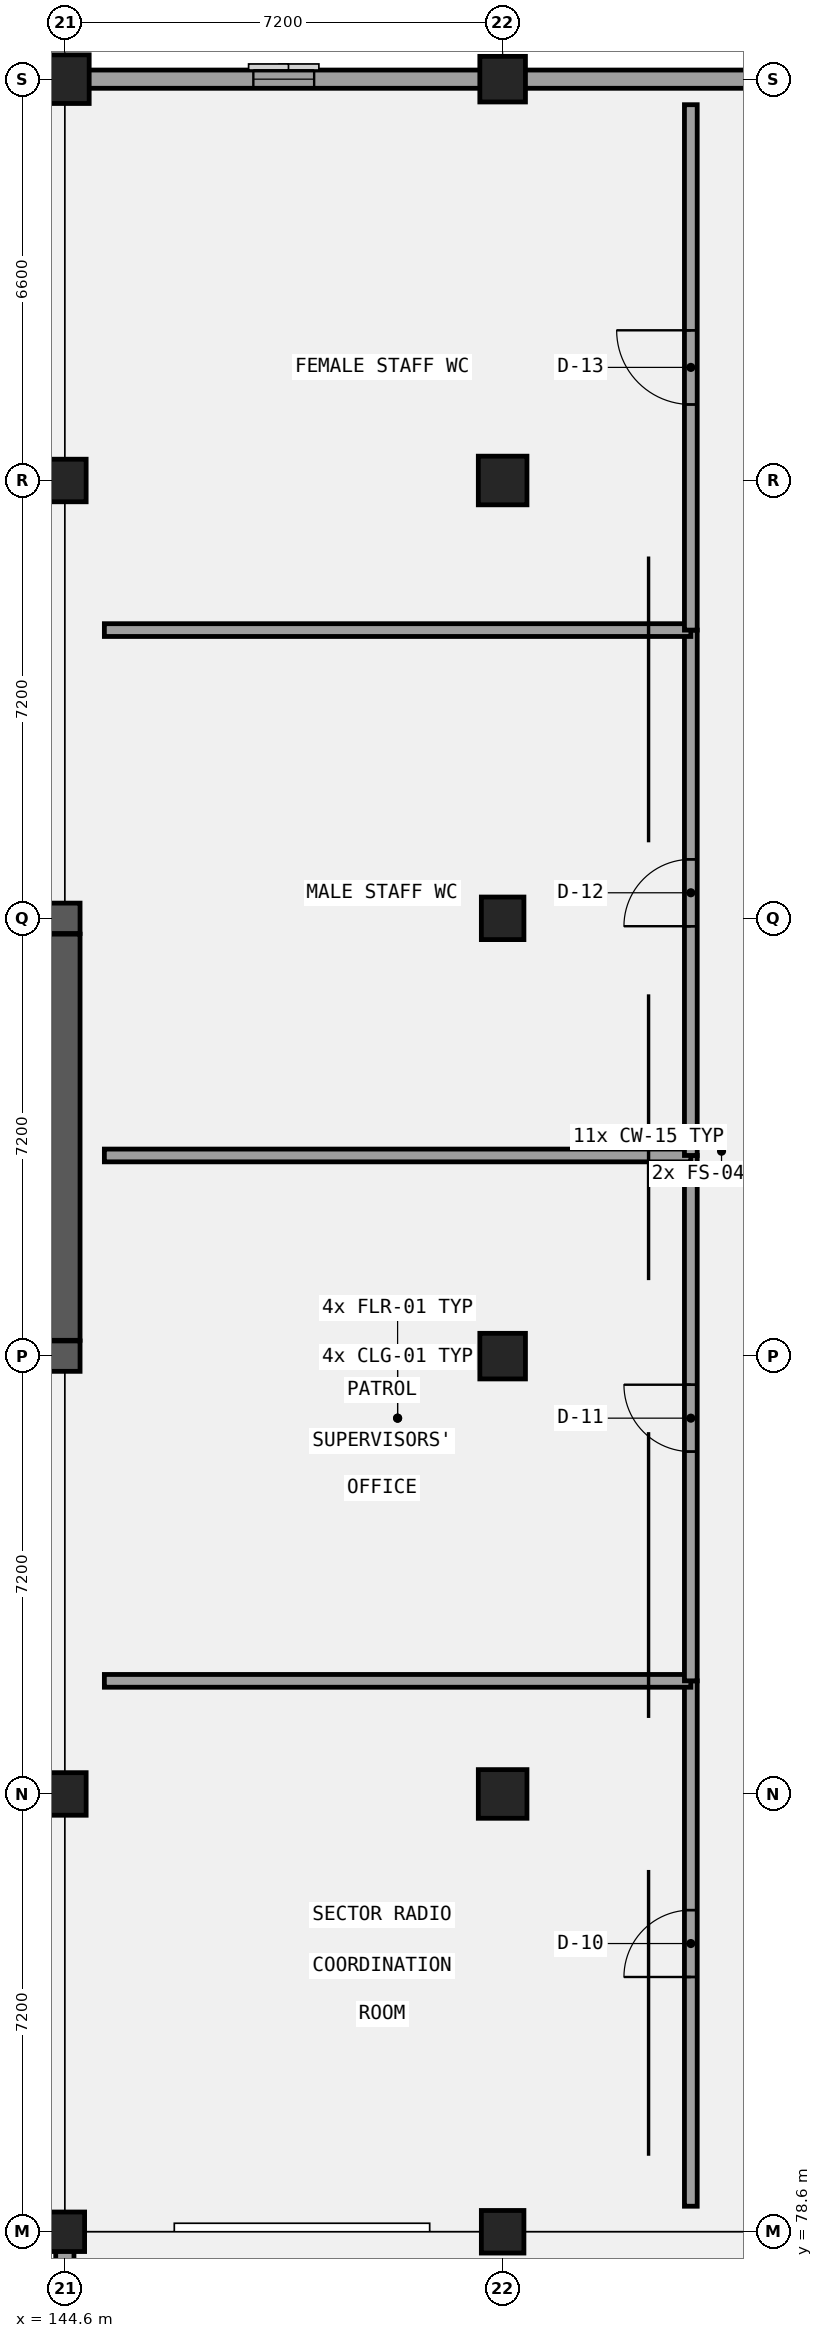
"""IFC4 building model, lengths in metres.
Left out: names, types, materials, properties, quantities, classifications, styles, units other than length and angle.
Written with IfcOpenShell. Run it as: python <this file> out.ifc"""

import sys

from ifc_helpers import new_model, si_unit, direction, frame, frame_2d, origin, origin_2d, place, context, subcontext, project, spatial, rectangle, circle, extrude, element, fill, save


model = new_model("IFC4")
c1 = context("Model", 3, precision=1e-05, world=origin(), true_north=direction((0.0, 1.0)))
c2 = subcontext(c1, "Body", "Model", "MODEL_VIEW")
j1 = project(units=[si_unit("LENGTHUNIT", "METRE"), si_unit("PLANEANGLEUNIT", "RADIAN")], contexts=[c1])
p1 = place(None, origin())
s1 = spatial("IfcSite", under=j1, at=p1, CompositionType="ELEMENT")
p2 = place(p1, origin())
s2 = spatial("IfcBuilding", under=s1, at=p2, CompositionType="ELEMENT")
p3 = place(p2, frame((0.0, 0.0, 5.4)))
s3 = spatial("IfcBuildingStorey", under=s2, at=p3, CompositionType="ELEMENT", Elevation=5.4)
p4 = place(p3, frame((129.95, 100.2, 0.0), z_axis=(0.0, 0.0, 1.0), x_axis=(1.0, 0.0, 0.0)))
e1 = element("IfcWall", 1, at=p4, inside=s3, PredefinedType="SHEAR", context=c2, shape_type="SweptSolid", body=[
    extrude(rectangle(XDim=14.9, YDim=0.5, at=frame_2d((7.45, 0.0))), origin(), (0.0, 0.0, 1.0), 4.2),
])
p5 = place(p3, frame((129.95, 93.0, 0.0), z_axis=(0.0, 0.0, 1.0), x_axis=(1.0, 0.0, 0.0)))
e2 = element("IfcWall", 2, at=p5, inside=s3, PredefinedType="SHEAR", context=c2, shape_type="SweptSolid", body=[
    extrude(rectangle(XDim=14.9, YDim=0.5, at=frame_2d((7.45, 0.0))), origin(), (0.0, 0.0, 1.0), 4.2),
])
p6 = place(p5, frame((3.8, 0.0, 0.0)))
e3 = element("IfcOpeningElement", 3, at=p6, cuts=e2, PredefinedType="OPENING", context=c2, shape_type="SweptSolid", body=[
    extrude(rectangle(XDim=1.3, YDim=2.2, at=frame_2d((0.65, 1.1))), frame((0.0, 0.26, 0.0), z_axis=(0.0, -1.0, 0.0), x_axis=(1.0, 0.0, 0.0)), (0.0, 0.0, 1.0), 0.52),
])
p7 = place(p5, frame((11.8, 0.0, 0.0)))
e4 = element("IfcOpeningElement", 4, at=p7, cuts=e2, PredefinedType="OPENING", context=c2, shape_type="SweptSolid", body=[
    extrude(rectangle(XDim=1.3, YDim=2.2, at=frame_2d((0.65, 1.1))), frame((0.0, 0.26, 0.0), z_axis=(0.0, -1.0, 0.0), x_axis=(1.0, 0.0, 0.0)), (0.0, 0.0, 1.0), 0.52),
])
p8 = place(p3, frame((144.6, 93.26, 0.0), z_axis=(0.0, 0.0, 1.0), x_axis=(0.0, 1.0, 0.0)))
e5 = element("IfcWall", 5, at=p8, inside=s3, PredefinedType="SHEAR", context=c2, shape_type="SweptSolid", body=[
    extrude(rectangle(XDim=6.68, YDim=0.5, at=frame_2d((3.34, 0.0))), origin(), (0.0, 0.0, 1.0), 4.2),
])
p9 = place(p3, frame((144.6, 78.6, 0.0), z_axis=(0.0, 0.0, 1.0), x_axis=(1.0, 0.0, 0.0)))
e6 = element("IfcColumn", 6, at=p9, inside=s3, PredefinedType="COLUMN", context=c2, shape_type="SweptSolid", body=[
    extrude(circle(Radius=0.325, at=origin_2d()), origin(), (0.0, 0.0, 1.0), 4.2),
])
for number, where, z_axis, x_axis in (
    (7, (144.6, 85.8, 0.0), (0.0, 0.0, 1.0), (1.0, 0.0, 0.0)),
    (8, (144.6, 107.4, 0.0), (0.0, 0.0, 1.0), (1.0, 0.0, 0.0)),
):
    element("IfcColumn", number, at=place(p3, frame(where, z_axis=z_axis, x_axis=x_axis)), inside=s3, PredefinedType="COLUMN", context=c2, shape_type="SweptSolid", body=[
        extrude(rectangle(XDim=0.7, YDim=0.7, at=origin_2d()), origin(), (0.0, 0.0, 1.0), 4.2),
    ])
p10 = place(p3, frame((144.6, 114.0, 0.0), z_axis=(0.0, 0.0, 1.0), x_axis=(1.0, 0.0, 0.0)))
e9 = element("IfcColumn", 9, at=p10, inside=s3, PredefinedType="COLUMN", context=c2, shape_type="SweptSolid", body=[
    extrude(rectangle(XDim=0.8, YDim=0.8, at=origin_2d()), origin(), (0.0, 0.0, 1.0), 4.2),
])
p11 = place(p3, frame((151.8, 78.6, 0.0), z_axis=(0.0, 0.0, 1.0), x_axis=(1.0, 0.0, 0.0)))
e10 = element("IfcColumn", 10, at=p11, inside=s3, PredefinedType="COLUMN", context=c2, shape_type="SweptSolid", body=[
    extrude(rectangle(XDim=0.7, YDim=0.7, at=origin_2d()), origin(), (0.0, 0.0, 1.0), 4.2),
])
p12 = place(p3, frame((151.8, 85.8, 0.0), z_axis=(0.0, 0.0, 1.0), x_axis=(1.0, 0.0, 0.0)))
e11 = element("IfcColumn", 11, at=p12, inside=s3, PredefinedType="COLUMN", context=c2, shape_type="SweptSolid", body=[
    extrude(rectangle(XDim=0.8, YDim=0.8, at=origin_2d()), origin(), (0.0, 0.0, 1.0), 4.2),
])
p13 = place(p3, frame((151.8, 93.0, 0.0), z_axis=(0.0, 0.0, 1.0), x_axis=(1.0, 0.0, 0.0)))
e12 = element("IfcColumn", 12, at=p13, inside=s3, PredefinedType="COLUMN", context=c2, shape_type="SweptSolid", body=[
    extrude(rectangle(XDim=0.75, YDim=0.75, at=origin_2d()), origin(), (0.0, 0.0, 1.0), 4.2),
])
p14 = place(p3, frame((151.8, 100.2, 0.0), z_axis=(0.0, 0.0, 1.0), x_axis=(1.0, 0.0, 0.0)))
e13 = element("IfcColumn", 13, at=p14, inside=s3, PredefinedType="COLUMN", context=c2, shape_type="SweptSolid", body=[
    extrude(rectangle(XDim=0.7, YDim=0.7, at=origin_2d()), origin(), (0.0, 0.0, 1.0), 4.2),
])
p15 = place(p3, frame((151.8, 107.4, 0.0), z_axis=(0.0, 0.0, 1.0), x_axis=(1.0, 0.0, 0.0)))
e14 = element("IfcColumn", 14, at=p15, inside=s3, PredefinedType="COLUMN", context=c2, shape_type="SweptSolid", body=[
    extrude(rectangle(XDim=0.8, YDim=0.8, at=origin_2d()), origin(), (0.0, 0.0, 1.0), 4.2),
])
p16 = place(p3, frame((151.8, 114.0, 0.0), z_axis=(0.0, 0.0, 1.0), x_axis=(1.0, 0.0, 0.0)))
e15 = element("IfcColumn", 15, at=p16, inside=s3, PredefinedType="COLUMN", context=c2, shape_type="SweptSolid", body=[
    extrude(rectangle(XDim=0.75, YDim=0.75, at=origin_2d()), origin(), (0.0, 0.0, 1.0), 4.2),
])
p17 = place(p3, frame((166.35, 114.0, 0.0), z_axis=(0.0, 0.0, 1.0), x_axis=(-1.0, 0.0, 0.0)))
e16 = element("IfcWall", 16, at=p17, inside=s3, PredefinedType="SOLIDWALL", context=c2, shape_type="SweptSolid", body=[
    extrude(rectangle(XDim=21.9, YDim=0.3, at=frame_2d((10.95, 0.0))), origin(), (0.0, 0.0, 1.0), 3.17),
])
p18 = place(p17, frame((17.65, 0.0, 0.95)))
e17 = element("IfcOpeningElement", 17, at=p18, cuts=e16, PredefinedType="OPENING", context=c2, shape_type="SweptSolid", body=[
    extrude(rectangle(XDim=1.0, YDim=1.9, at=frame_2d((0.5, 0.95))), frame((0.0, 0.16, 0.0), z_axis=(0.0, -1.0, 0.0), x_axis=(1.0, 0.0, 0.0)), (0.0, 0.0, 1.0), 0.32),
])
p19 = place(p3, frame((144.75, 114.0, 0.0), z_axis=(0.0, 0.0, 1.0), x_axis=(-1.0, 0.0, 0.0)))
e18 = element("IfcWall", 18, at=p19, inside=s3, PredefinedType="SOLIDWALL", context=c2, shape_type="SweptSolid", body=[
    extrude(rectangle(XDim=36.3, YDim=0.3, at=frame_2d((18.15, 0.0))), origin(), (0.0, 0.0, 1.0), 3.17),
])
p20 = place(p19, frame((32.05, 0.0, 0.95)))
e19 = element("IfcOpeningElement", 19, at=p20, cuts=e18, PredefinedType="OPENING", context=c2, shape_type="SweptSolid", body=[
    extrude(rectangle(XDim=1.0, YDim=1.9, at=frame_2d((0.5, 0.95))), frame((0.0, 0.16, 0.0), z_axis=(0.0, -1.0, 0.0), x_axis=(1.0, 0.0, 0.0)), (0.0, 0.0, 1.0), 0.32),
])
p21 = place(p19, frame((24.775, 0.0, 0.95)))
e20 = element("IfcOpeningElement", 20, at=p21, cuts=e18, PredefinedType="OPENING", context=c2, shape_type="SweptSolid", body=[
    extrude(rectangle(XDim=1.15, YDim=1.4, at=frame_2d((0.575, 0.7))), frame((0.0, 0.16, 0.0), z_axis=(0.0, -1.0, 0.0), x_axis=(1.0, 0.0, 0.0)), (0.0, 0.0, 1.0), 0.32),
])
p22 = place(p19, frame((17.575, 0.0, 0.95)))
e21 = element("IfcOpeningElement", 21, at=p22, cuts=e18, PredefinedType="OPENING", context=c2, shape_type="SweptSolid", body=[
    extrude(rectangle(XDim=1.15, YDim=1.65, at=frame_2d((0.575, 0.825))), frame((0.0, 0.16, 0.0), z_axis=(0.0, -1.0, 0.0), x_axis=(1.0, 0.0, 0.0)), (0.0, 0.0, 1.0), 0.32),
])
p23 = place(p19, frame((10.375, 0.0, 0.95)))
e22 = element("IfcOpeningElement", 22, at=p23, cuts=e18, PredefinedType="OPENING", context=c2, shape_type="SweptSolid", body=[
    extrude(rectangle(XDim=1.15, YDim=1.9, at=frame_2d((0.575, 0.95))), frame((0.0, 0.16, 0.0), z_axis=(0.0, -1.0, 0.0), x_axis=(1.0, 0.0, 0.0)), (0.0, 0.0, 1.0), 0.32),
])
p24 = place(p19, frame((3.1, 0.0, 0.95)))
e23 = element("IfcOpeningElement", 23, at=p24, cuts=e18, PredefinedType="OPENING", context=c2, shape_type="SweptSolid", body=[
    extrude(rectangle(XDim=1.3, YDim=1.4, at=frame_2d((0.65, 0.7))), frame((0.0, 0.16, 0.0), z_axis=(0.0, -1.0, 0.0), x_axis=(1.0, 0.0, 0.0)), (0.0, 0.0, 1.0), 0.32),
])
p25 = place(p3, frame((108.45, 78.6, 0.0), z_axis=(0.0, 0.0, 1.0), x_axis=(1.0, 0.0, 0.0)))
e24 = element("IfcWall", 24, at=p25, inside=s3, PredefinedType="SOLIDWALL", context=c2, shape_type="SweptSolid", body=[
    extrude(rectangle(XDim=36.3, YDim=0.3, at=frame_2d((18.15, 0.0))), origin(), (0.0, 0.0, 1.0), 3.02),
])
p26 = place(p25, frame((3.175, 0.0, 0.95)))
e25 = element("IfcOpeningElement", 25, at=p26, cuts=e24, PredefinedType="OPENING", context=c2, shape_type="SweptSolid", body=[
    extrude(rectangle(XDim=1.15, YDim=1.65, at=frame_2d((0.575, 0.825))), frame((0.0, 0.16, 0.0), z_axis=(0.0, -1.0, 0.0), x_axis=(1.0, 0.0, 0.0)), (0.0, 0.0, 1.0), 0.32),
])
p27 = place(p25, frame((10.3, 0.0, 0.95)))
e26 = element("IfcOpeningElement", 26, at=p27, cuts=e24, PredefinedType="OPENING", context=c2, shape_type="SweptSolid", body=[
    extrude(rectangle(XDim=1.3, YDim=1.4, at=frame_2d((0.65, 0.7))), frame((0.0, 0.16, 0.0), z_axis=(0.0, -1.0, 0.0), x_axis=(1.0, 0.0, 0.0)), (0.0, 0.0, 1.0), 0.32),
])
p28 = place(p25, frame((17.5, 0.0, 0.95)))
e27 = element("IfcOpeningElement", 27, at=p28, cuts=e24, PredefinedType="OPENING", context=c2, shape_type="SweptSolid", body=[
    extrude(rectangle(XDim=1.3, YDim=1.65, at=frame_2d((0.65, 0.825))), frame((0.0, 0.16, 0.0), z_axis=(0.0, -1.0, 0.0), x_axis=(1.0, 0.0, 0.0)), (0.0, 0.0, 1.0), 0.32),
])
p29 = place(p25, frame((24.625, 0.0, 0.95)))
e28 = element("IfcOpeningElement", 28, at=p29, cuts=e24, PredefinedType="OPENING", context=c2, shape_type="SweptSolid", body=[
    extrude(rectangle(XDim=1.45, YDim=1.4, at=frame_2d((0.725, 0.7))), frame((0.0, 0.16, 0.0), z_axis=(0.0, -1.0, 0.0), x_axis=(1.0, 0.0, 0.0)), (0.0, 0.0, 1.0), 0.32),
])
p30 = place(p25, frame((31.825, 0.0, 0.95)))
e29 = element("IfcOpeningElement", 29, at=p30, cuts=e24, PredefinedType="OPENING", context=c2, shape_type="SweptSolid", body=[
    extrude(rectangle(XDim=1.45, YDim=1.65, at=frame_2d((0.725, 0.825))), frame((0.0, 0.16, 0.0), z_axis=(0.0, -1.0, 0.0), x_axis=(1.0, 0.0, 0.0)), (0.0, 0.0, 1.0), 0.32),
])
p31 = place(p3, frame((144.6, 78.45, 0.0), z_axis=(0.0, 0.0, 1.0), x_axis=(0.0, -1.0, 0.0)))
e30 = element("IfcWall", 30, at=p31, inside=s3, PredefinedType="SOLIDWALL", context=c2, shape_type="SweptSolid", body=[
    extrude(rectangle(XDim=42.9, YDim=0.3, at=frame_2d((21.45, 0.0))), origin(), (0.0, 0.0, 1.0), 2.92),
])
p32 = place(p31, frame((38.275, 0.0, 1.0)))
e31 = element("IfcOpeningElement", 31, at=p32, cuts=e30, PredefinedType="OPENING", context=c2, shape_type="SweptSolid", body=[
    extrude(rectangle(XDim=2.2, YDim=1.4, at=frame_2d((1.1, 0.7))), frame((0.0, 0.16, 0.0), z_axis=(0.0, -1.0, 0.0), x_axis=(1.0, 0.0, 0.0)), (0.0, 0.0, 1.0), 0.32),
])
p33 = place(p31, frame((31.15, 0.0, 1.0)))
e32 = element("IfcOpeningElement", 32, at=p33, cuts=e30, PredefinedType="OPENING", context=c2, shape_type="SweptSolid", body=[
    extrude(rectangle(XDim=2.2, YDim=1.4, at=frame_2d((1.1, 0.7))), frame((0.0, 0.16, 0.0), z_axis=(0.0, -1.0, 0.0), x_axis=(1.0, 0.0, 0.0)), (0.0, 0.0, 1.0), 0.32),
])
p34 = place(p31, frame((23.95, 0.0, 1.0)))
e33 = element("IfcOpeningElement", 33, at=p34, cuts=e30, PredefinedType="OPENING", context=c2, shape_type="SweptSolid", body=[
    extrude(rectangle(XDim=2.2, YDim=1.4, at=frame_2d((1.1, 0.7))), frame((0.0, 0.16, 0.0), z_axis=(0.0, -1.0, 0.0), x_axis=(1.0, 0.0, 0.0)), (0.0, 0.0, 1.0), 0.32),
])
p35 = place(p31, frame((16.75, 0.0, 1.0)))
e34 = element("IfcOpeningElement", 34, at=p35, cuts=e30, PredefinedType="OPENING", context=c2, shape_type="SweptSolid", body=[
    extrude(rectangle(XDim=2.2, YDim=1.4, at=frame_2d((1.1, 0.7))), frame((0.0, 0.16, 0.0), z_axis=(0.0, -1.0, 0.0), x_axis=(1.0, 0.0, 0.0)), (0.0, 0.0, 1.0), 0.32),
])
p36 = place(p31, frame((9.55, 0.0, 1.0)))
e35 = element("IfcOpeningElement", 35, at=p36, cuts=e30, PredefinedType="OPENING", context=c2, shape_type="SweptSolid", body=[
    extrude(rectangle(XDim=2.2, YDim=1.4, at=frame_2d((1.1, 0.7))), frame((0.0, 0.16, 0.0), z_axis=(0.0, -1.0, 0.0), x_axis=(1.0, 0.0, 0.0)), (0.0, 0.0, 1.0), 0.32),
])
p37 = place(p31, frame((2.425, 0.0, 1.0)))
e36 = element("IfcOpeningElement", 36, at=p37, cuts=e30, PredefinedType="OPENING", context=c2, shape_type="SweptSolid", body=[
    extrude(rectangle(XDim=2.2, YDim=1.4, at=frame_2d((1.1, 0.7))), frame((0.0, 0.16, 0.0), z_axis=(0.0, -1.0, 0.0), x_axis=(1.0, 0.0, 0.0)), (0.0, 0.0, 1.0), 0.32),
])
p38 = place(p3, frame((154.895, 79.02, 0.0), z_axis=(0.0, 0.0, 1.0), x_axis=(0.0, 1.0, 0.0)))
e37 = element("IfcWall", 37, at=p38, inside=s3, PredefinedType="PARTITIONING", context=c2, shape_type="SweptSolid", body=[
    extrude(rectangle(XDim=8.64, YDim=0.21, at=frame_2d((4.32, 0.0))), origin(), (0.0, 0.0, 1.0), 3.92),
])
p39 = place(p38, frame((3.77, 0.0, 0.0)))
e38 = element("IfcOpeningElement", 38, at=p39, cuts=e37, PredefinedType="OPENING", context=c2, shape_type="SweptSolid", body=[
    extrude(rectangle(XDim=1.1, YDim=2.1, at=frame_2d((0.55, 1.05))), frame((0.0, 0.115, 0.0), z_axis=(0.0, -1.0, 0.0), x_axis=(1.0, 0.0, 0.0)), (0.0, 0.0, 1.0), 0.23),
])
p40 = place(p3, frame((145.25, 87.66, 0.0), z_axis=(0.0, 0.0, 1.0), x_axis=(1.0, 0.0, 0.0)))
e39 = element("IfcWall", 39, at=p40, inside=s3, PredefinedType="PARTITIONING", context=c2, shape_type="SweptSolid", body=[
    extrude(rectangle(XDim=9.645, YDim=0.21, at=frame_2d((4.823, 0.0))), origin(), (0.0, 0.0, 1.0), 3.37),
])
p41 = place(p3, frame((154.895, 87.66, 0.0), z_axis=(0.0, 0.0, 1.0), x_axis=(0.0, 1.0, 0.0)))
e40 = element("IfcWall", 40, at=p41, inside=s3, PredefinedType="PARTITIONING", context=c2, shape_type="SweptSolid", body=[
    extrude(rectangle(XDim=8.64, YDim=0.21, at=frame_2d((4.32, 0.0))), origin(), (0.0, 0.0, 1.0), 3.92),
])
p42 = place(p41, frame((3.77, 0.0, 0.0)))
e41 = element("IfcOpeningElement", 41, at=p42, cuts=e40, PredefinedType="OPENING", context=c2, shape_type="SweptSolid", body=[
    extrude(rectangle(XDim=1.1, YDim=2.22, at=frame_2d((0.55, 1.11))), frame((0.0, 0.115, 0.0), z_axis=(0.0, -1.0, 0.0), x_axis=(1.0, 0.0, 0.0)), (0.0, 0.0, 1.0), 0.23),
])
p43 = place(p3, frame((145.25, 96.3, 0.0), z_axis=(0.0, 0.0, 1.0), x_axis=(1.0, 0.0, 0.0)))
e42 = element("IfcWall", 42, at=p43, inside=s3, PredefinedType="PARTITIONING", context=c2, shape_type="SweptSolid", body=[
    extrude(rectangle(XDim=9.645, YDim=0.21, at=frame_2d((4.823, 0.0))), origin(), (0.0, 0.0, 1.0), 3.92),
])
p44 = place(p3, frame((154.895, 96.3, 0.0), z_axis=(0.0, 0.0, 1.0), x_axis=(0.0, 1.0, 0.0)))
e43 = element("IfcWall", 43, at=p44, inside=s3, PredefinedType="PARTITIONING", context=c2, shape_type="SweptSolid", body=[
    extrude(rectangle(XDim=8.64, YDim=0.21, at=frame_2d((4.32, 0.0))), origin(), (0.0, 0.0, 1.0), 3.92),
])
p45 = place(p44, frame((3.77, 0.0, 0.0)))
e44 = element("IfcOpeningElement", 44, at=p45, cuts=e43, PredefinedType="OPENING", context=c2, shape_type="SweptSolid", body=[
    extrude(rectangle(XDim=1.1, YDim=2.35, at=frame_2d((0.55, 1.175))), frame((0.0, 0.115, 0.0), z_axis=(0.0, -1.0, 0.0), x_axis=(1.0, 0.0, 0.0)), (0.0, 0.0, 1.0), 0.23),
])
p46 = place(p3, frame((145.25, 104.94, 0.0), z_axis=(0.0, 0.0, 1.0), x_axis=(1.0, 0.0, 0.0)))
e45 = element("IfcWall", 45, at=p46, inside=s3, PredefinedType="PARTITIONING", context=c2, shape_type="SweptSolid", body=[
    extrude(rectangle(XDim=9.645, YDim=0.21, at=frame_2d((4.823, 0.0))), origin(), (0.0, 0.0, 1.0), 3.92),
])
p47 = place(p3, frame((154.895, 104.94, 0.0), z_axis=(0.0, 0.0, 1.0), x_axis=(0.0, 1.0, 0.0)))
e46 = element("IfcWall", 46, at=p47, inside=s3, PredefinedType="PARTITIONING", context=c2, shape_type="SweptSolid", body=[
    extrude(rectangle(XDim=8.64, YDim=0.21, at=frame_2d((4.32, 0.0))), origin(), (0.0, 0.0, 1.0), 3.92),
])
p48 = place(p47, frame((3.71, 0.0, 0.0)))
e47 = element("IfcOpeningElement", 47, at=p48, cuts=e46, PredefinedType="OPENING", context=c2, shape_type="SweptSolid", body=[
    extrude(rectangle(XDim=1.22, YDim=2.1, at=frame_2d((0.61, 1.05))), frame((0.0, 0.115, 0.0), z_axis=(0.0, -1.0, 0.0), x_axis=(1.0, 0.0, 0.0)), (0.0, 0.0, 1.0), 0.23),
])
p49 = place(p18, origin())
e48 = element("IfcWindow", 48, at=p49, inside=s3, PartitioningType="SINGLE_PANEL", PredefinedType="WINDOW", context=c2, shape_type="SweptSolid", body=[
    extrude(rectangle(XDim=1.0, YDim=1.9, at=frame_2d((0.5, 0.95))), frame((0.0, 0.03, 0.0), z_axis=(0.0, -1.0, 0.0), x_axis=(1.0, 0.0, 0.0)), (0.0, 0.0, 1.0), 0.06),
])
fill(e17, e48)
p50 = place(p39, frame((1.1, 0.0, 0.0), z_axis=(0.0, 0.0, 1.0), x_axis=(-1.0, 0.0, 0.0)))
e49 = element("IfcDoor", 49, at=p50, inside=s3, OperationType="SINGLE_SWING_LEFT", PredefinedType="DOOR", context=c2, shape_type="SweptSolid", body=[
    extrude(rectangle(XDim=1.1, YDim=2.1, at=frame_2d((0.55, 1.05))), frame((0.0, 0.025, 0.0), z_axis=(0.0, -1.0, 0.0), x_axis=(1.0, 0.0, 0.0)), (0.0, 0.0, 1.0), 0.05),
])
fill(e38, e49)
p51 = place(p42, frame((1.1, 0.0, 0.0), z_axis=(0.0, 0.0, 1.0), x_axis=(-1.0, 0.0, 0.0)))
e50 = element("IfcDoor", 50, at=p51, inside=s3, OperationType="SINGLE_SWING_RIGHT", PredefinedType="DOOR", context=c2, shape_type="SweptSolid", body=[
    extrude(rectangle(XDim=1.1, YDim=2.22, at=frame_2d((0.55, 1.11))), frame((0.0, 0.025, 0.0), z_axis=(0.0, -1.0, 0.0), x_axis=(1.0, 0.0, 0.0)), (0.0, 0.0, 1.0), 0.05),
])
fill(e41, e50)
p52 = place(p45, frame((1.1, 0.0, 0.0), z_axis=(0.0, 0.0, 1.0), x_axis=(-1.0, 0.0, 0.0)))
e51 = element("IfcDoor", 51, at=p52, inside=s3, OperationType="SINGLE_SWING_LEFT", PredefinedType="DOOR", context=c2, shape_type="SweptSolid", body=[
    extrude(rectangle(XDim=1.1, YDim=2.35, at=frame_2d((0.55, 1.175))), frame((0.0, 0.025, 0.0), z_axis=(0.0, -1.0, 0.0), x_axis=(1.0, 0.0, 0.0)), (0.0, 0.0, 1.0), 0.05),
])
fill(e44, e51)
p53 = place(p48, frame((1.22, 0.0, 0.0), z_axis=(0.0, 0.0, 1.0), x_axis=(-1.0, 0.0, 0.0)))
e52 = element("IfcDoor", 52, at=p53, inside=s3, OperationType="SINGLE_SWING_RIGHT", PredefinedType="DOOR", context=c2, shape_type="SweptSolid", body=[
    extrude(rectangle(XDim=1.22, YDim=2.1, at=frame_2d((0.61, 1.05))), frame((0.0, 0.025, 0.0), z_axis=(0.0, -1.0, 0.0), x_axis=(1.0, 0.0, 0.0)), (0.0, 0.0, 1.0), 0.05),
])
fill(e47, e52)
save(model, sys.argv[1])
